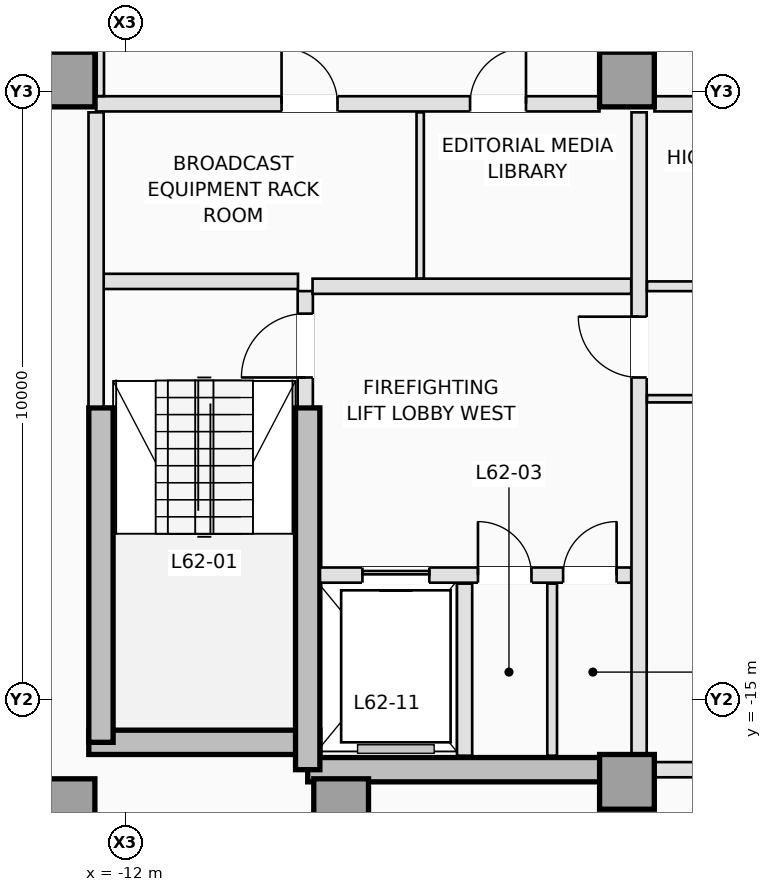
"""IFC4 building model, lengths in metres.
Left out: names, types, materials, properties, quantities, classifications, styles, units other than length and angle.
Written with IfcOpenShell. Run it as: python <this file> out.ifc"""

import sys

from ifc_helpers import new_model, si_unit, direction, frame, frame_2d, origin, origin_2d, place, context, subcontext, project, spatial, rectangle, extrude, element, fill, save


model = new_model("IFC4")
c1 = context("Model", 3, precision=1e-05, world=origin(), true_north=direction((0.0, 1.0)))
c2 = subcontext(c1, "Body", "Model", "MODEL_VIEW")
j1 = project(units=[si_unit("LENGTHUNIT", "METRE"), si_unit("PLANEANGLEUNIT", "RADIAN")], contexts=[c1])
p1 = place(None, origin())
s1 = spatial("IfcSite", under=j1, at=p1, CompositionType="ELEMENT")
p2 = place(p1, origin())
s2 = spatial("IfcBuilding", under=s1, at=p2, CompositionType="ELEMENT")
p3 = place(p2, frame((0.0, 0.0, 225.4)))
s3 = spatial("IfcBuildingStorey", under=s2, at=p3, CompositionType="ELEMENT", Elevation=225.4)
p4 = place(p3, frame((-12.6, -15.7, 0.0), z_axis=(0.0, 0.0, 1.0), x_axis=(1.0, 0.0, 0.0)))
e1 = element("IfcWall", 1, at=p4, inside=s3, PredefinedType="SHEAR", context=c2, shape_type="SweptSolid", body=[
    extrude(rectangle(XDim=3.8, YDim=0.4, at=frame_2d((1.9, 0.0))), origin(), (0.0, 0.0, 1.0), 3.5),
])
p5 = place(p3, frame((-9.0, -16.15, 0.0), z_axis=(0.0, 0.0, 1.0), x_axis=(1.0, 0.0, 0.0)))
e2 = element("IfcWall", 2, at=p5, inside=s3, PredefinedType="SHEAR", context=c2, shape_type="SweptSolid", body=[
    extrude(rectangle(XDim=5.25, YDim=0.4, at=frame_2d((2.625, 0.0))), origin(), (0.0, 0.0, 1.0), 3.5),
])
p6 = place(p3, frame((-12.4, -15.7, 0.0), z_axis=(0.0, 0.0, 1.0), x_axis=(0.0, 1.0, 0.0)))
e3 = element("IfcWall", 3, at=p6, inside=s3, PredefinedType="SHEAR", context=c2, shape_type="SweptSolid", body=[
    extrude(rectangle(XDim=5.5, YDim=0.4, at=frame_2d((2.75, 0.0))), origin(), (0.0, 0.0, 1.0), 3.5),
])
p7 = place(p3, frame((-9.0, -16.15, 0.0), z_axis=(0.0, 0.0, 1.0), x_axis=(0.0, 1.0, 0.0)))
e4 = element("IfcWall", 4, at=p7, inside=s3, PredefinedType="SHEAR", context=c2, shape_type="SweptSolid", body=[
    extrude(rectangle(XDim=5.95, YDim=0.4, at=frame_2d((2.975, 0.0))), origin(), (0.0, 0.0, 1.0), 3.5),
])
for number, where, z_axis, x_axis in (
    (5, (-12.95, -16.75, 0.0), (0.0, 0.0, 1.0), (1.0, 0.0, 0.0)),
    (6, (-8.45, -16.75, 0.0), (0.0, 0.0, 1.0), (1.0, 0.0, 0.0)),
    (7, (-3.75, -16.35, 0.0), (0.0, 0.0, 1.0), (1.0, 0.0, 0.0)),
    (8, (-12.95, -4.8, 0.0), (0.0, 0.0, 1.0), (1.0, 0.0, 0.0)),
    (9, (-3.75, -4.8, 0.0), (0.0, 0.0, 1.0), (1.0, 0.0, 0.0)),
):
    element("IfcColumn", number, at=place(p3, frame(where, z_axis=z_axis, x_axis=x_axis)), inside=s3, PredefinedType="COLUMN", context=c2, shape_type="SweptSolid", body=[
        extrude(rectangle(XDim=0.9, YDim=0.9, at=origin_2d()), origin(), (0.0, 0.0, 1.0), 3.5),
    ])
p8 = place(p3, frame((-9.04, -10.18, 0.0), z_axis=(0.0, 0.0, 1.0), x_axis=(0.0, 1.0, 0.0)))
e10 = element("IfcWall", 10, at=p8, inside=s3, PredefinedType="PARTITIONING", context=c2, shape_type="SweptSolid", body=[
    extrude(rectangle(XDim=1.9, YDim=0.25, at=frame_2d((0.95, 0.0))), origin(), (0.0, 0.0, 1.0), 3.25),
])
p9 = place(p8, frame((0.48, 0.0, 0.0)))
e11 = element("IfcOpeningElement", 11, at=p9, cuts=e10, PredefinedType="OPENING", context=c2, shape_type="SweptSolid", body=[
    extrude(rectangle(XDim=1.05, YDim=2.15, at=frame_2d((0.525, 1.075))), frame((0.0, 0.135, 0.0), z_axis=(0.0, -1.0, 0.0), x_axis=(1.0, 0.0, 0.0)), (0.0, 0.0, 1.0), 0.27),
])
p10 = place(p3, frame((-12.38, -8.12, 0.0), z_axis=(0.0, 0.0, 1.0), x_axis=(1.0, 0.0, 0.0)))
e12 = element("IfcWall", 12, at=p10, inside=s3, PredefinedType="PARTITIONING", context=c2, shape_type="SweptSolid", body=[
    extrude(rectangle(XDim=3.22, YDim=0.25, at=frame_2d((1.61, 0.0))), origin(), (0.0, 0.0, 1.0), 3.25),
])
p11 = place(p3, frame((-12.48, -10.18, 0.0), z_axis=(0.0, 0.0, 1.0), x_axis=(0.0, 1.0, 0.0)))
e13 = element("IfcWall", 13, at=p11, inside=s3, PredefinedType="PARTITIONING", context=c2, shape_type="SweptSolid", body=[
    extrude(rectangle(XDim=4.84, YDim=0.25, at=frame_2d((2.42, 0.0))), origin(), (0.0, 0.0, 1.0), 3.25),
])
p12 = place(p3, frame((-8.798, -12.95, 0.0), z_axis=(0.0, 0.0, 1.0), x_axis=(1.0, 0.0, 0.0)))
e14 = element("IfcWall", 14, at=p12, inside=s3, PredefinedType="PARTITIONING", context=c2, shape_type="SweptSolid", body=[
    extrude(rectangle(XDim=5.118, YDim=0.25, at=frame_2d((2.559, 0.0))), origin(), (0.0, 0.0, 1.0), 3.25),
])
p13 = place(p12, frame((0.698, 0.0, 0.0)))
e15 = element("IfcOpeningElement", 15, at=p13, cuts=e14, PredefinedType="OPENING", context=c2, shape_type="SweptSolid", body=[
    extrude(rectangle(XDim=1.1, YDim=2.15, at=frame_2d((0.55, 1.075))), frame((0.0, 0.135, 0.0), z_axis=(0.0, -1.0, 0.0), x_axis=(1.0, 0.0, 0.0)), (0.0, 0.0, 1.0), 0.27),
])
p14 = place(p12, frame((2.598, 0.0, 0.0)))
e16 = element("IfcOpeningElement", 16, at=p14, cuts=e14, PredefinedType="OPENING", context=c2, shape_type="SweptSolid", body=[
    extrude(rectangle(XDim=0.88, YDim=2.1, at=frame_2d((0.44, 1.05))), frame((0.0, 0.135, 0.0), z_axis=(0.0, -1.0, 0.0), x_axis=(1.0, 0.0, 0.0)), (0.0, 0.0, 1.0), 0.27),
])
p15 = place(p12, frame((3.998, 0.0, 0.0)))
e17 = element("IfcOpeningElement", 17, at=p15, cuts=e14, PredefinedType="OPENING", context=c2, shape_type="SweptSolid", body=[
    extrude(rectangle(XDim=0.88, YDim=2.1, at=frame_2d((0.44, 1.05))), frame((0.0, 0.135, 0.0), z_axis=(0.0, -1.0, 0.0), x_axis=(1.0, 0.0, 0.0)), (0.0, 0.0, 1.0), 0.27),
])
p16 = place(p3, frame((-6.42, -15.92, 0.0), z_axis=(0.0, 0.0, 1.0), x_axis=(0.0, 1.0, 0.0)))
e18 = element("IfcWall", 18, at=p16, inside=s3, PredefinedType="PARTITIONING", context=c2, shape_type="SweptSolid", body=[
    extrude(rectangle(XDim=2.83, YDim=0.25, at=frame_2d((1.415, 0.0))), origin(), (0.0, 0.0, 1.0), 3.25),
])
p17 = place(p3, frame((-4.98, -15.92, 0.0), z_axis=(0.0, 0.0, 1.0), x_axis=(0.0, 1.0, 0.0)))
e19 = element("IfcWall", 19, at=p17, inside=s3, PredefinedType="PARTITIONING", context=c2, shape_type="SweptSolid", body=[
    extrude(rectangle(XDim=2.83, YDim=0.16, at=frame_2d((1.415, 0.0))), origin(), (0.0, 0.0, 1.0), 3.25),
])
p18 = place(p3, frame((-8.92, -8.2, 0.0), z_axis=(0.0, 0.0, 1.0), x_axis=(1.0, 0.0, 0.0)))
e20 = element("IfcWall", 20, at=p18, inside=s3, PredefinedType="PARTITIONING", context=c2, shape_type="SweptSolid", body=[
    extrude(rectangle(XDim=5.24, YDim=0.25, at=frame_2d((2.62, 0.0))), origin(), (0.0, 0.0, 1.0), 3.25),
])
p19 = place(p3, frame((-3.55, -15.898, 0.0), z_axis=(0.0, 0.0, 1.0), x_axis=(0.0, 1.0, 0.0)))
e21 = element("IfcWall", 21, at=p19, inside=s3, PredefinedType="PARTITIONING", context=c2, shape_type="SweptSolid", body=[
    extrude(rectangle(XDim=10.558, YDim=0.25, at=frame_2d((5.279, 0.0))), origin(), (0.0, 0.0, 1.0), 3.25),
])
p20 = place(p19, frame((6.198, 0.0, 0.0)))
e22 = element("IfcOpeningElement", 22, at=p20, cuts=e21, PredefinedType="OPENING", context=c2, shape_type="SweptSolid", body=[
    extrude(rectangle(XDim=1.0, YDim=2.15, at=frame_2d((0.5, 1.075))), frame((0.0, 0.135, 0.0), z_axis=(0.0, -1.0, 0.0), x_axis=(1.0, 0.0, 0.0)), (0.0, 0.0, 1.0), 0.27),
])
p21 = place(p3, frame((-12.48, -5.2, 0.0), z_axis=(0.0, 0.0, 1.0), x_axis=(1.0, 0.0, 0.0)))
e23 = element("IfcWall", 23, at=p21, inside=s3, PredefinedType="PARTITIONING", context=c2, shape_type="SweptSolid", body=[
    extrude(rectangle(XDim=8.278, YDim=0.25, at=frame_2d((4.139, 0.0))), origin(), (0.0, 0.0, 1.0), 3.25),
])
p22 = place(p21, frame((3.05, 0.0, 0.0)))
e24 = element("IfcOpeningElement", 24, at=p22, cuts=e23, PredefinedType="OPENING", context=c2, shape_type="SweptSolid", body=[
    extrude(rectangle(XDim=0.92, YDim=2.12, at=frame_2d((0.46, 1.06))), frame((0.0, 0.135, 0.0), z_axis=(0.0, -1.0, 0.0), x_axis=(1.0, 0.0, 0.0)), (0.0, 0.0, 1.0), 0.27),
])
p23 = place(p21, frame((6.15, 0.0, 0.0)))
e25 = element("IfcOpeningElement", 25, at=p23, cuts=e23, PredefinedType="OPENING", context=c2, shape_type="SweptSolid", body=[
    extrude(rectangle(XDim=0.92, YDim=2.12, at=frame_2d((0.46, 1.06))), frame((0.0, 0.135, 0.0), z_axis=(0.0, -1.0, 0.0), x_axis=(1.0, 0.0, 0.0)), (0.0, 0.0, 1.0), 0.27),
])
p24 = place(p3, frame((-3.298, -5.2, 0.0), z_axis=(0.0, 0.0, 1.0), x_axis=(1.0, 0.0, 0.0)))
e26 = element("IfcWall", 26, at=p24, inside=s3, PredefinedType="PARTITIONING", context=c2, shape_type="SweptSolid", body=[
    extrude(rectangle(XDim=2.348, YDim=0.25, at=frame_2d((1.174, 0.0))), origin(), (0.0, 0.0, 1.0), 3.25),
])
p25 = place(p3, frame((-7.15, -8.073, 0.0), z_axis=(0.0, 0.0, 1.0), x_axis=(0.0, 1.0, 0.0)))
e27 = element("IfcWall", 27, at=p25, inside=s3, PredefinedType="PARTITIONING", context=c2, shape_type="SweptSolid", body=[
    extrude(rectangle(XDim=2.733, YDim=0.12, at=frame_2d((1.366, 0.0))), origin(), (0.0, 0.0, 1.0), 3.25),
])
p26 = place(p3, frame((-3.298, -16.15, 0.0), z_axis=(0.0, 0.0, 1.0), x_axis=(1.0, 0.0, 0.0)))
e28 = element("IfcWall", 28, at=p26, inside=s3, PredefinedType="PARTITIONING", context=c2, shape_type="SweptSolid", body=[
    extrude(rectangle(XDim=6.596, YDim=0.25, at=frame_2d((3.298, 0.0))), origin(), (0.0, 0.0, 1.0), 2.45),
])
p27 = place(p3, frame((-3.42, -8.2, 0.0), z_axis=(0.0, 0.0, 1.0), x_axis=(1.0, 0.0, 0.0)))
e29 = element("IfcWall", 29, at=p27, inside=s3, PredefinedType="PARTITIONING", context=c2, shape_type="SweptSolid", body=[
    extrude(rectangle(XDim=6.84, YDim=0.16, at=frame_2d((3.42, 0.0))), origin(), (0.0, 0.0, 1.0), 3.25),
])
p28 = place(p27, frame((2.92, 0.0, 0.0)))
e30 = element("IfcOpeningElement", 30, at=p28, cuts=e29, PredefinedType="OPENING", context=c2, shape_type="SweptSolid", body=[
    extrude(rectangle(XDim=1.0, YDim=2.15, at=frame_2d((0.5, 1.075))), frame((0.0, 0.09, 0.0), z_axis=(0.0, -1.0, 0.0), x_axis=(1.0, 0.0, 0.0)), (0.0, 0.0, 1.0), 0.18),
])
p29 = place(p3, frame((-3.42, -10.05, 0.0), z_axis=(0.0, 0.0, 1.0), x_axis=(1.0, 0.0, 0.0)))
e31 = element("IfcWall", 31, at=p29, inside=s3, PredefinedType="PARTITIONING", context=c2, shape_type="SweptSolid", body=[
    extrude(rectangle(XDim=6.84, YDim=0.12, at=frame_2d((3.42, 0.0))), origin(), (0.0, 0.0, 1.0), 3.25),
])
p30 = place(p29, frame((1.85, 0.0, 0.0)))
e32 = element("IfcOpeningElement", 32, at=p30, cuts=e31, PredefinedType="OPENING", context=c2, shape_type="SweptSolid", body=[
    extrude(rectangle(XDim=0.92, YDim=2.12, at=frame_2d((0.46, 1.06))), frame((0.0, 0.07, 0.0), z_axis=(0.0, -1.0, 0.0), x_axis=(1.0, 0.0, 0.0)), (0.0, 0.0, 1.0), 0.14),
])
p31 = place(p29, frame((5.35, 0.0, 0.0)))
e33 = element("IfcOpeningElement", 33, at=p31, cuts=e31, PredefinedType="OPENING", context=c2, shape_type="SweptSolid", body=[
    extrude(rectangle(XDim=0.88, YDim=2.12, at=frame_2d((0.44, 1.06))), frame((0.0, 0.07, 0.0), z_axis=(0.0, -1.0, 0.0), x_axis=(1.0, 0.0, 0.0)), (0.0, 0.0, 1.0), 0.14),
])
p32 = place(p3, frame((-12.41, -5.073, 0.0), z_axis=(0.0, 0.0, 1.0), x_axis=(0.0, 1.0, 0.0)))
e34 = element("IfcWall", 34, at=p32, inside=s3, PredefinedType="PARTITIONING", context=c2, shape_type="SweptSolid", body=[
    extrude(rectangle(XDim=2.673, YDim=0.12, at=frame_2d((1.336, 0.0))), origin(), (0.0, 0.0, 1.0), 3.25),
])
p33 = place(p13, origin())
e35 = element("IfcDoor", 35, at=p33, inside=s3, OperationType="SLIDING_TO_LEFT", PredefinedType="DOOR", context=c2, shape_type="SweptSolid", body=[
    extrude(rectangle(XDim=1.1, YDim=2.15, at=frame_2d((0.55, 1.075))), frame((0.0, 0.025, 0.0), z_axis=(0.0, -1.0, 0.0), x_axis=(1.0, 0.0, 0.0)), (0.0, 0.0, 1.0), 0.05),
])
fill(e15, e35)
p34 = place(p9, origin())
e36 = element("IfcDoor", 36, at=p34, inside=s3, OperationType="SINGLE_SWING_LEFT", PredefinedType="DOOR", context=c2, shape_type="SweptSolid", body=[
    extrude(rectangle(XDim=1.05, YDim=2.15, at=frame_2d((0.525, 1.075))), frame((0.0, 0.025, 0.0), z_axis=(0.0, -1.0, 0.0), x_axis=(1.0, 0.0, 0.0)), (0.0, 0.0, 1.0), 0.05),
])
fill(e11, e36)
p35 = place(p14, origin())
e37 = element("IfcDoor", 37, at=p35, inside=s3, OperationType="SINGLE_SWING_LEFT", PredefinedType="TRAPDOOR", context=c2, shape_type="SweptSolid", body=[
    extrude(rectangle(XDim=0.88, YDim=2.1, at=frame_2d((0.44, 1.05))), frame((0.0, 0.025, 0.0), z_axis=(0.0, -1.0, 0.0), x_axis=(1.0, 0.0, 0.0)), (0.0, 0.0, 1.0), 0.05),
])
fill(e16, e37)
p36 = place(p15, origin())
e38 = element("IfcDoor", 38, at=p36, inside=s3, OperationType="SINGLE_SWING_RIGHT", PredefinedType="TRAPDOOR", context=c2, shape_type="SweptSolid", body=[
    extrude(rectangle(XDim=0.88, YDim=2.1, at=frame_2d((0.44, 1.05))), frame((0.0, 0.025, 0.0), z_axis=(0.0, -1.0, 0.0), x_axis=(1.0, 0.0, 0.0)), (0.0, 0.0, 1.0), 0.05),
])
fill(e17, e38)
p37 = place(p20, origin())
e39 = element("IfcDoor", 39, at=p37, inside=s3, OperationType="SINGLE_SWING_RIGHT", PredefinedType="DOOR", context=c2, shape_type="SweptSolid", body=[
    extrude(rectangle(XDim=1.0, YDim=2.15, at=frame_2d((0.5, 1.075))), frame((0.0, 0.025, 0.0), z_axis=(0.0, -1.0, 0.0), x_axis=(1.0, 0.0, 0.0)), (0.0, 0.0, 1.0), 0.05),
])
fill(e22, e39)
p38 = place(p22, origin())
e40 = element("IfcDoor", 40, at=p38, inside=s3, OperationType="SINGLE_SWING_LEFT", PredefinedType="DOOR", context=c2, shape_type="SweptSolid", body=[
    extrude(rectangle(XDim=0.92, YDim=2.12, at=frame_2d((0.46, 1.06))), frame((0.0, 0.025, 0.0), z_axis=(0.0, -1.0, 0.0), x_axis=(1.0, 0.0, 0.0)), (0.0, 0.0, 1.0), 0.05),
])
fill(e24, e40)
p39 = place(p23, origin())
e41 = element("IfcDoor", 41, at=p39, inside=s3, OperationType="SINGLE_SWING_RIGHT", PredefinedType="DOOR", context=c2, shape_type="SweptSolid", body=[
    extrude(rectangle(XDim=0.92, YDim=2.12, at=frame_2d((0.46, 1.06))), frame((0.0, 0.025, 0.0), z_axis=(0.0, -1.0, 0.0), x_axis=(1.0, 0.0, 0.0)), (0.0, 0.0, 1.0), 0.05),
])
fill(e25, e41)
save(model, sys.argv[1])
